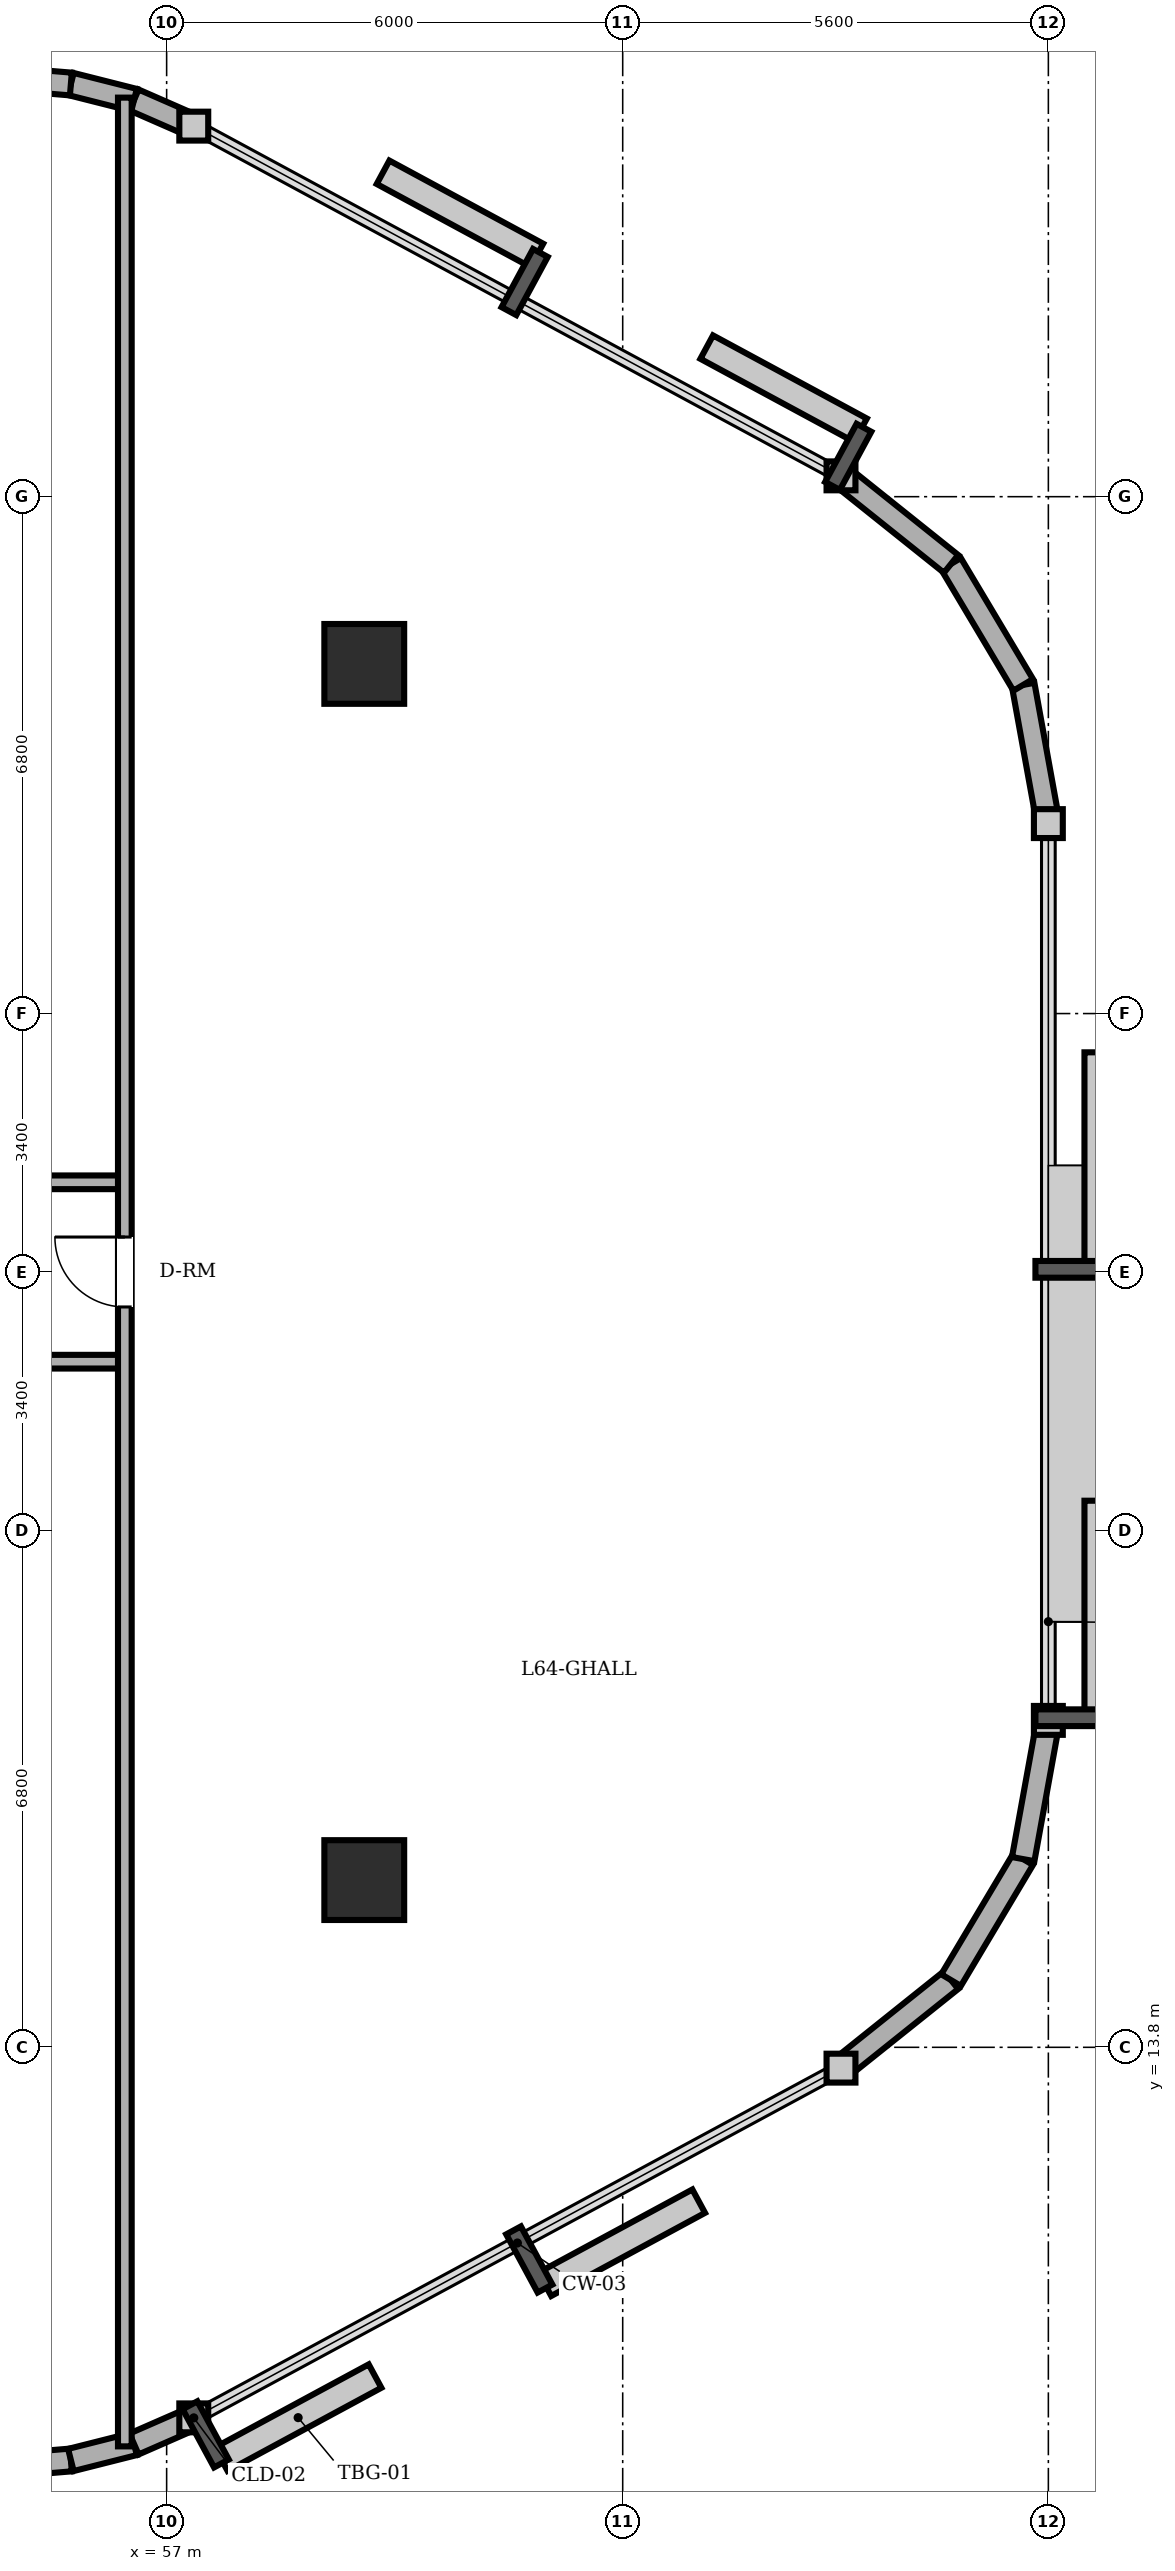
"""IFC4 building model, lengths in metres.
Left out: names, types, materials, properties, quantities, classifications, styles, units other than length and angle.
Written with IfcOpenShell. Run it as: python <this file> out.ifc"""

import sys

from ifc_helpers import new_model, si_unit, direction, frame, frame_2d, origin, origin_2d, place, context, subcontext, project, spatial, rectangle, circle, extrude, element, fill, save


model = new_model("IFC4")
c1 = context("Model", 3, precision=1e-05, world=origin(), true_north=direction((0.0, 1.0)))
c2 = subcontext(c1, "Body", "Model", "MODEL_VIEW")
j1 = project(units=[si_unit("LENGTHUNIT", "METRE"), si_unit("PLANEANGLEUNIT", "RADIAN")], contexts=[c1])
p1 = place(None, origin())
s1 = spatial("IfcSite", under=j1, at=p1, CompositionType="ELEMENT")
p2 = place(p1, origin())
s2 = spatial("IfcBuilding", under=s1, at=p2, CompositionType="ELEMENT")
p3 = place(p2, frame((0.0, 0.0, 244.5)))
s3 = spatial("IfcBuildingStorey", under=s2, at=p3, CompositionType="ELEMENT", Elevation=244.5)
for number, where, z_axis, x_axis in (
    (1, (59.6, 16.0, 0.0), (0.0, 0.0, 1.0), (1.0, 0.0, 0.0)),
    (2, (59.6, 32.0, 0.0), (0.0, 0.0, 1.0), (1.0, 0.0, 0.0)),
):
    element("IfcColumn", number, at=place(p3, frame(where, z_axis=z_axis, x_axis=x_axis)), inside=s3, PredefinedType="COLUMN", context=c2, shape_type="SweptSolid", body=[
        extrude(circle(Radius=0.525, at=origin_2d()), origin(), (0.0, 0.0, 1.0), 3.6),
    ])
p4 = place(p3, frame((54.885, 8.3, 0.0), z_axis=(0.0, 0.0, 1.0), x_axis=(0.996565355958, 0.082809971041, 0.0)))
e3 = element("IfcWall", 3, at=p4, inside=s3, PredefinedType="SOLIDWALL", context=c2, shape_type="SweptSolid", body=[
    extrude(rectangle(XDim=0.858, YDim=0.3, at=frame_2d((0.429, 0.0))), origin(), (0.0, 0.0, 1.0), 3.36),
])
p5 = place(p3, frame((55.74, 8.371, 0.0), z_axis=(0.0, 0.0, 1.0), x_axis=(0.969536346338, 0.244947490555, 0.0)))
e4 = element("IfcWall", 4, at=p5, inside=s3, PredefinedType="SOLIDWALL", context=c2, shape_type="SweptSolid", body=[
    extrude(rectangle(XDim=0.857, YDim=0.3, at=frame_2d((0.429, 0.0))), origin(), (0.0, 0.0, 1.0), 3.36),
])
p6 = place(p3, frame((56.571, 8.581, 0.0), z_axis=(0.0, 0.0, 1.0), x_axis=(0.916085473636, 0.400983048261, 0.0)))
e5 = element("IfcWall", 5, at=p6, inside=s3, PredefinedType="SOLIDWALL", context=c2, shape_type="SweptSolid", body=[
    extrude(rectangle(XDim=0.858, YDim=0.3, at=frame_2d((0.429, 0.0))), origin(), (0.0, 0.0, 1.0), 3.36),
])
p7 = place(p3, frame((65.872, 13.526, 0.0), z_axis=(0.0, 0.0, 1.0), x_axis=(0.780920189257, 0.624630817372, 0.0)))
e6 = element("IfcWall", 6, at=p7, inside=s3, PredefinedType="SOLIDWALL", context=c2, shape_type="SweptSolid", body=[
    extrude(rectangle(XDim=1.854, YDim=0.3, at=frame_2d((0.927, 0.0))), origin(), (0.0, 0.0, 1.0), 3.36),
])
p8 = place(p3, frame((67.32, 14.684, 0.0), z_axis=(0.0, 0.0, 1.0), x_axis=(0.512072018927, 0.858942516955, 0.0)))
e7 = element("IfcWall", 7, at=p8, inside=s3, PredefinedType="SOLIDWALL", context=c2, shape_type="SweptSolid", body=[
    extrude(rectangle(XDim=1.853, YDim=0.3, at=frame_2d((0.927, 0.0))), origin(), (0.0, 0.0, 1.0), 3.36),
])
for number, where, z_axis, x_axis in (
    (8, (68.269, 16.276, 0.0), (0.0, 0.0, 1.0), (0.178, 0.984, 0.0)),
    (9, (68.6, 29.899, 0.0), (0.0, 0.0, 1.0), (-0.178, 0.984, 0.0)),
):
    element("IfcWall", number, at=place(p3, frame(where, z_axis=z_axis, x_axis=x_axis)), inside=s3, PredefinedType="SOLIDWALL", context=c2, shape_type="SweptSolid", body=[
        extrude(rectangle(XDim=1.855, YDim=0.3, at=frame_2d((0.927, 0.0))), origin(), (0.0, 0.0, 1.0), 3.36),
    ])
p9 = place(p3, frame((68.269, 31.724, 0.0), z_axis=(0.0, 0.0, 1.0), x_axis=(-0.512072018927, 0.858942516955, 0.0)))
e10 = element("IfcWall", 10, at=p9, inside=s3, PredefinedType="SOLIDWALL", context=c2, shape_type="SweptSolid", body=[
    extrude(rectangle(XDim=1.853, YDim=0.3, at=frame_2d((0.927, 0.0))), origin(), (0.0, 0.0, 1.0), 3.36),
])
p10 = place(p3, frame((67.32, 33.316, 0.0), z_axis=(0.0, 0.0, 1.0), x_axis=(-0.780920189257, 0.624630817372, 0.0)))
e11 = element("IfcWall", 11, at=p10, inside=s3, PredefinedType="SOLIDWALL", context=c2, shape_type="SweptSolid", body=[
    extrude(rectangle(XDim=1.854, YDim=0.3, at=frame_2d((0.927, 0.0))), origin(), (0.0, 0.0, 1.0), 3.36),
])
p11 = place(p3, frame((57.357, 39.075, 0.0), z_axis=(0.0, 0.0, 1.0), x_axis=(-0.916085473636, 0.400983048261, 0.0)))
e12 = element("IfcWall", 12, at=p11, inside=s3, PredefinedType="SOLIDWALL", context=c2, shape_type="SweptSolid", body=[
    extrude(rectangle(XDim=0.858, YDim=0.3, at=frame_2d((0.429, 0.0))), origin(), (0.0, 0.0, 1.0), 3.36),
])
p12 = place(p3, frame((56.571, 39.419, 0.0), z_axis=(0.0, 0.0, 1.0), x_axis=(-0.969536346338, 0.244947490555, 0.0)))
e13 = element("IfcWall", 13, at=p12, inside=s3, PredefinedType="SOLIDWALL", context=c2, shape_type="SweptSolid", body=[
    extrude(rectangle(XDim=0.857, YDim=0.3, at=frame_2d((0.429, 0.0))), origin(), (0.0, 0.0, 1.0), 3.36),
])
p13 = place(p3, frame((55.74, 39.629, 0.0), z_axis=(0.0, 0.0, 1.0), x_axis=(-0.996565355958, 0.082809971041, 0.0)))
e14 = element("IfcWall", 14, at=p13, inside=s3, PredefinedType="SOLIDWALL", context=c2, shape_type="SweptSolid", body=[
    extrude(rectangle(XDim=0.858, YDim=0.3, at=frame_2d((0.429, 0.0))), origin(), (0.0, 0.0, 1.0), 3.36),
])
p14 = place(p3, frame((41.75, 22.82, 0.0), z_axis=(0.0, 0.0, 1.0), x_axis=(1.0, 0.0, 0.0)))
e15 = element("IfcWall", 15, at=p14, inside=s3, PredefinedType="PARTITIONING", context=c2, shape_type="SweptSolid", body=[
    extrude(rectangle(XDim=14.7, YDim=0.18, at=frame_2d((7.35, 0.0))), origin(), (0.0, 0.0, 1.0), 3.36),
])
p15 = place(p14, frame((6.89, 0.0, 0.0)))
e16 = element("IfcOpeningElement", 16, at=p15, cuts=e15, PredefinedType="OPENING", context=c2, shape_type="SweptSolid", body=[
    extrude(rectangle(XDim=0.92, YDim=2.1, at=frame_2d((0.46, 1.05))), frame((0.0, 0.1, 0.0), z_axis=(0.0, -1.0, 0.0), x_axis=(1.0, 0.0, 0.0)), (0.0, 0.0, 1.0), 0.2),
])
p16 = place(p3, frame((41.75, 25.18, 0.0), z_axis=(0.0, 0.0, 1.0), x_axis=(1.0, 0.0, 0.0)))
e17 = element("IfcWall", 17, at=p16, inside=s3, PredefinedType="PARTITIONING", context=c2, shape_type="SweptSolid", body=[
    extrude(rectangle(XDim=14.7, YDim=0.18, at=frame_2d((7.35, 0.0))), origin(), (0.0, 0.0, 1.0), 3.36),
])
p17 = place(p16, frame((6.89, 0.0, 0.0)))
e18 = element("IfcOpeningElement", 18, at=p17, cuts=e17, PredefinedType="OPENING", context=c2, shape_type="SweptSolid", body=[
    extrude(rectangle(XDim=0.92, YDim=2.1, at=frame_2d((0.46, 1.05))), frame((0.0, 0.1, 0.0), z_axis=(0.0, -1.0, 0.0), x_axis=(1.0, 0.0, 0.0)), (0.0, 0.0, 1.0), 0.2),
])
p18 = place(p3, frame((56.45, 8.55, 0.0), z_axis=(0.0, 0.0, 1.0), x_axis=(0.0, 1.0, 0.0)))
e19 = element("IfcWall", 19, at=p18, inside=s3, PredefinedType="PARTITIONING", context=c2, shape_type="SweptSolid", body=[
    extrude(rectangle(XDim=30.9, YDim=0.18, at=frame_2d((15.45, 0.0))), origin(), (0.0, 0.0, 1.0), 3.36),
])
p19 = place(p18, frame((14.99, 0.0, 0.0)))
e20 = element("IfcOpeningElement", 20, at=p19, cuts=e19, PredefinedType="OPENING", context=c2, shape_type="SweptSolid", body=[
    extrude(rectangle(XDim=0.92, YDim=2.1, at=frame_2d((0.46, 1.05))), frame((0.0, 0.1, 0.0), z_axis=(0.0, -1.0, 0.0), x_axis=(1.0, 0.0, 0.0)), (0.0, 0.0, 1.0), 0.2),
])
p20 = place(p19, origin())
e21 = element("IfcDoor", 21, at=p20, inside=s3, OperationType="SINGLE_SWING_RIGHT", PredefinedType="DOOR", context=c2, shape_type="SweptSolid", body=[
    extrude(rectangle(XDim=0.92, YDim=2.1, at=frame_2d((0.46, 1.05))), frame((0.0, 0.025, 0.0), z_axis=(0.0, -1.0, 0.0), x_axis=(1.0, 0.0, 0.0)), (0.0, 0.0, 1.0), 0.05),
])
fill(e20, e21)
save(model, sys.argv[1])
